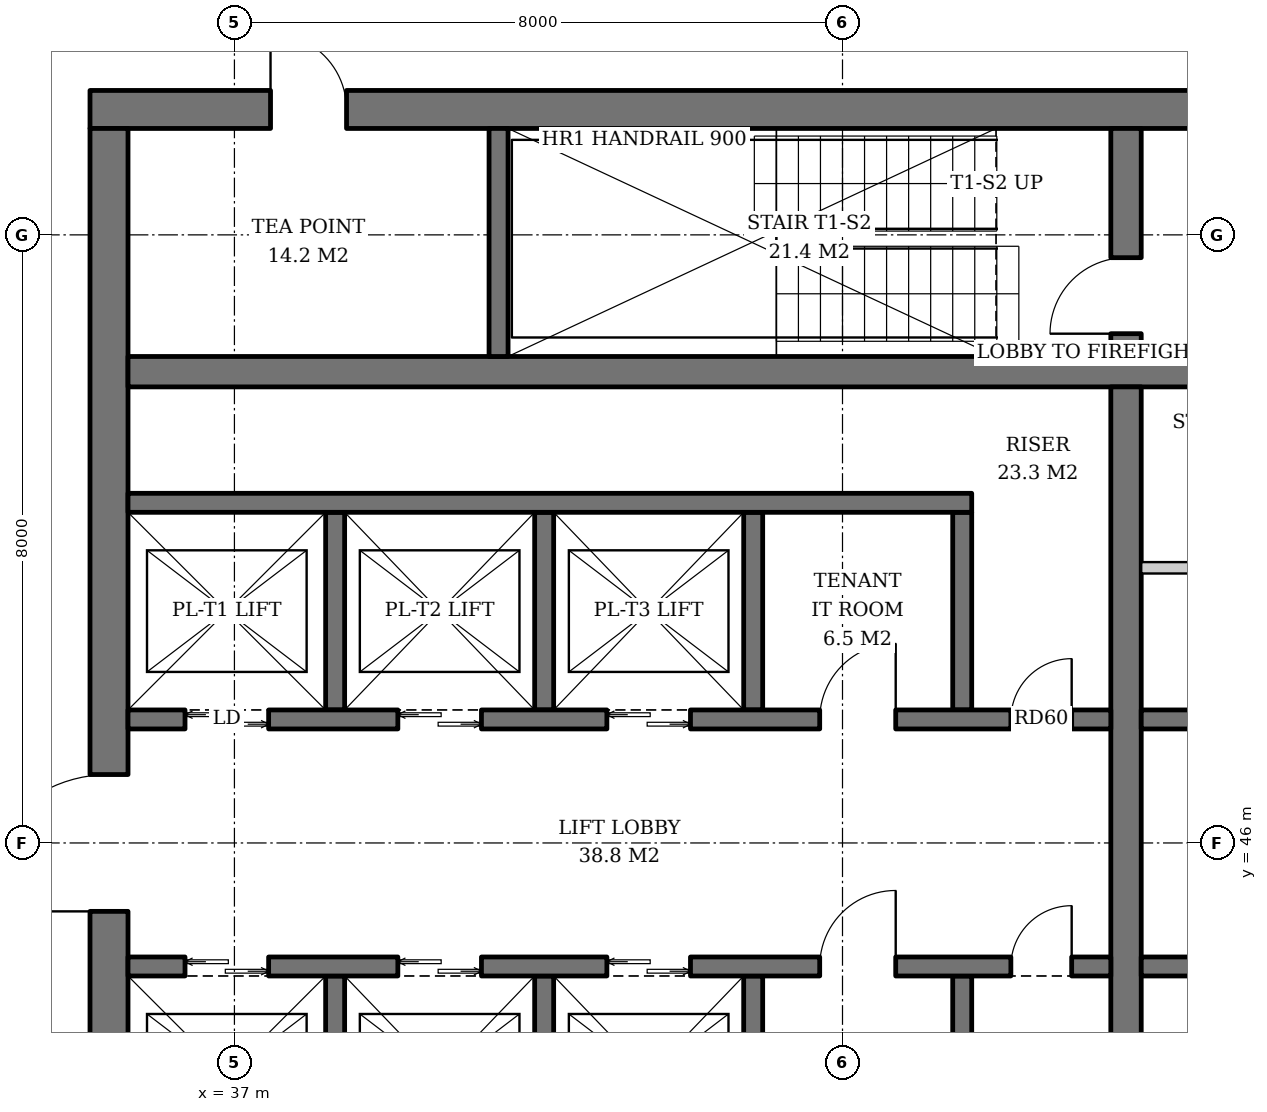
"""IFC4 building model, lengths in metres.
Left out: names, types, materials, properties, quantities, classifications, styles, units other than length and angle.
Written with IfcOpenShell. Run it as: python <this file> out.ifc"""

import sys

from ifc_helpers import new_model, si_unit, direction, frame, frame_2d, origin, place, context, subcontext, project, spatial, rectangle, extrude, element, fill, save


model = new_model("IFC4")
c1 = context("Model", 3, precision=1e-05, world=origin(), true_north=direction((0.0, 1.0)))
c2 = subcontext(c1, "Body", "Model", "MODEL_VIEW")
j1 = project(units=[si_unit("LENGTHUNIT", "METRE"), si_unit("PLANEANGLEUNIT", "RADIAN")], contexts=[c1])
p1 = place(None, origin())
s1 = spatial("IfcSite", under=j1, at=p1, CompositionType="ELEMENT")
p2 = place(p1, origin())
s2 = spatial("IfcBuilding", under=s1, at=p2, CompositionType="ELEMENT")
p3 = place(p2, frame((0.0, 0.0, 271.8)))
s3 = spatial("IfcBuildingStorey", under=s2, at=p3, CompositionType="ELEMENT", Elevation=271.8)
p4 = place(p3, frame((35.1, 55.65, 0.0), z_axis=(0.0, 0.0, 1.0), x_axis=(1.0, 0.0, 0.0)))
e1 = element("IfcWall", 1, at=p4, inside=s3, PredefinedType="SHEAR", context=c2, shape_type="SweptSolid", body=[
    extrude(rectangle(XDim=19.8, YDim=0.5, at=frame_2d((9.9, 0.0))), origin(), (0.0, 0.0, 1.0), 3.8),
])
p5 = place(p4, frame((14.54, 0.0, 0.0)))
e2 = element("IfcOpeningElement", 2, at=p5, cuts=e1, PredefinedType="OPENING", context=c2, shape_type="SweptSolid", body=[
    extrude(rectangle(XDim=1.0, YDim=2.1, at=frame_2d((0.5, 1.05))), frame((0.0, 0.26, 0.0), z_axis=(0.0, -1.0, 0.0), x_axis=(1.0, 0.0, 0.0)), (0.0, 0.0, 1.0), 0.52),
])
p6 = place(p4, frame((2.375, 0.0, 0.0)))
e3 = element("IfcOpeningElement", 3, at=p6, cuts=e1, PredefinedType="OPENING", context=c2, shape_type="SweptSolid", body=[
    extrude(rectangle(XDim=1.0, YDim=2.1, at=frame_2d((0.5, 1.05))), frame((0.0, 0.26, 0.0), z_axis=(0.0, -1.0, 0.0), x_axis=(1.0, 0.0, 0.0)), (0.0, 0.0, 1.0), 0.52),
])
p7 = place(p3, frame((35.35, 36.6, 0.0), z_axis=(0.0, 0.0, 1.0), x_axis=(0.0, 1.0, 0.0)))
e4 = element("IfcWall", 4, at=p7, inside=s3, PredefinedType="SHEAR", context=c2, shape_type="SweptSolid", body=[
    extrude(rectangle(XDim=18.8, YDim=0.5, at=frame_2d((9.4, 0.0))), origin(), (0.0, 0.0, 1.0), 3.8),
])
p8 = place(p7, frame((8.5, 0.0, 0.0)))
e5 = element("IfcOpeningElement", 5, at=p8, cuts=e4, PredefinedType="OPENING", context=c2, shape_type="SweptSolid", body=[
    extrude(rectangle(XDim=1.8, YDim=2.4, at=frame_2d((0.9, 1.2))), frame((0.0, 0.26, 0.0), z_axis=(0.0, -1.0, 0.0), x_axis=(1.0, 0.0, 0.0)), (0.0, 0.0, 1.0), 0.52),
])
p9 = place(p3, frame((35.6, 52.2, 0.0), z_axis=(0.0, 0.0, 1.0), x_axis=(1.0, 0.0, 0.0)))
e6 = element("IfcWall", 6, at=p9, inside=s3, PredefinedType="SHEAR", context=c2, shape_type="SweptSolid", body=[
    extrude(rectangle(XDim=18.8, YDim=0.4, at=frame_2d((9.4, 0.0))), origin(), (0.0, 0.0, 1.0), 3.8),
])
p10 = place(p3, frame((48.73, 40.0, 0.0), z_axis=(0.0, 0.0, 1.0), x_axis=(0.0, 1.0, 0.0)))
e7 = element("IfcWall", 7, at=p10, inside=s3, PredefinedType="SHEAR", context=c2, shape_type="SweptSolid", body=[
    extrude(rectangle(XDim=12.0, YDim=0.4, at=frame_2d((6.0, 0.0))), origin(), (0.0, 0.0, 1.0), 3.8),
])
p11 = place(p3, frame((48.73, 52.4, 0.0), z_axis=(0.0, 0.0, 1.0), x_axis=(0.0, 1.0, 0.0)))
e8 = element("IfcWall", 8, at=p11, inside=s3, PredefinedType="SHEAR", context=c2, shape_type="SweptSolid", body=[
    extrude(rectangle(XDim=3.0, YDim=0.4, at=frame_2d((1.5, 0.0))), origin(), (0.0, 0.0, 1.0), 3.8),
])
p12 = place(p11, frame((0.3, 0.0, 0.0)))
e9 = element("IfcOpeningElement", 9, at=p12, cuts=e8, PredefinedType="OPENING", context=c2, shape_type="SweptSolid", body=[
    extrude(rectangle(XDim=1.0, YDim=2.1, at=frame_2d((0.5, 1.05))), frame((0.0, 0.21, 0.0), z_axis=(0.0, -1.0, 0.0), x_axis=(1.0, 0.0, 0.0)), (0.0, 0.0, 1.0), 0.42),
])
p13 = place(p3, frame((40.475, 52.4, 0.0), z_axis=(0.0, 0.0, 1.0), x_axis=(0.0, 1.0, 0.0)))
e10 = element("IfcWall", 10, at=p13, inside=s3, PredefinedType="SHEAR", context=c2, shape_type="SweptSolid", body=[
    extrude(rectangle(XDim=3.0, YDim=0.25, at=frame_2d((1.5, 0.0))), origin(), (0.0, 0.0, 1.0), 3.8),
])
for number, where, z_axis, x_axis in (
    (11, (38.325, 47.75, 0.0), (0.0, 0.0, 1.0), (0.0, 1.0, 0.0)),
    (12, (41.075, 47.75, 0.0), (0.0, 0.0, 1.0), (0.0, 1.0, 0.0)),
    (13, (43.825, 47.75, 0.0), (0.0, 0.0, 1.0), (0.0, 1.0, 0.0)),
    (14, (46.575, 47.75, 0.0), (0.0, 0.0, 1.0), (0.0, 1.0, 0.0)),
):
    element("IfcWall", number, at=place(p3, frame(where, z_axis=z_axis, x_axis=x_axis)), inside=s3, PredefinedType="SHEAR", context=c2, shape_type="SweptSolid", body=[
        extrude(rectangle(XDim=2.6, YDim=0.25, at=frame_2d((1.3, 0.0))), origin(), (0.0, 0.0, 1.0), 3.8),
    ])
p14 = place(p3, frame((35.6, 50.475, 0.0), z_axis=(0.0, 0.0, 1.0), x_axis=(1.0, 0.0, 0.0)))
e15 = element("IfcWall", 15, at=p14, inside=s3, PredefinedType="SHEAR", context=c2, shape_type="SweptSolid", body=[
    extrude(rectangle(XDim=11.1, YDim=0.25, at=frame_2d((5.55, 0.0))), origin(), (0.0, 0.0, 1.0), 3.8),
])
p15 = place(p3, frame((35.6, 47.625, 0.0), z_axis=(0.0, 0.0, 1.0), x_axis=(1.0, 0.0, 0.0)))
e16 = element("IfcWall", 16, at=p15, inside=s3, PredefinedType="SHEAR", context=c2, shape_type="SweptSolid", body=[
    extrude(rectangle(XDim=12.93, YDim=0.25, at=frame_2d((6.465, 0.0))), origin(), (0.0, 0.0, 1.0), 3.8),
])
p16 = place(p15, frame((0.75, 0.0, 0.0)))
e17 = element("IfcOpeningElement", 17, at=p16, cuts=e16, PredefinedType="OPENING", context=c2, shape_type="SweptSolid", body=[
    extrude(rectangle(XDim=1.1, YDim=2.2, at=frame_2d((0.55, 1.1))), frame((0.0, 0.135, 0.0), z_axis=(0.0, -1.0, 0.0), x_axis=(1.0, 0.0, 0.0)), (0.0, 0.0, 1.0), 0.27),
])
p17 = place(p15, frame((3.55, 0.0, 0.0)))
e18 = element("IfcOpeningElement", 18, at=p17, cuts=e16, PredefinedType="OPENING", context=c2, shape_type="SweptSolid", body=[
    extrude(rectangle(XDim=1.1, YDim=2.2, at=frame_2d((0.55, 1.1))), frame((0.0, 0.135, 0.0), z_axis=(0.0, -1.0, 0.0), x_axis=(1.0, 0.0, 0.0)), (0.0, 0.0, 1.0), 0.27),
])
p18 = place(p15, frame((6.3, 0.0, 0.0)))
e19 = element("IfcOpeningElement", 19, at=p18, cuts=e16, PredefinedType="OPENING", context=c2, shape_type="SweptSolid", body=[
    extrude(rectangle(XDim=1.1, YDim=2.2, at=frame_2d((0.55, 1.1))), frame((0.0, 0.135, 0.0), z_axis=(0.0, -1.0, 0.0), x_axis=(1.0, 0.0, 0.0)), (0.0, 0.0, 1.0), 0.27),
])
p19 = place(p15, frame((9.1, 0.0, 0.0)))
e20 = element("IfcOpeningElement", 20, at=p19, cuts=e16, PredefinedType="OPENING", context=c2, shape_type="SweptSolid", body=[
    extrude(rectangle(XDim=1.0, YDim=2.1, at=frame_2d((0.5, 1.05))), frame((0.0, 0.135, 0.0), z_axis=(0.0, -1.0, 0.0), x_axis=(1.0, 0.0, 0.0)), (0.0, 0.0, 1.0), 0.27),
])
p20 = place(p15, frame((11.615, 0.0, 0.0)))
e21 = element("IfcOpeningElement", 21, at=p20, cuts=e16, PredefinedType="OPENING", context=c2, shape_type="SweptSolid", body=[
    extrude(rectangle(XDim=0.8, YDim=2.0, at=frame_2d((0.4, 1.0))), frame((0.0, 0.135, 0.0), z_axis=(0.0, -1.0, 0.0), x_axis=(1.0, 0.0, 0.0)), (0.0, 0.0, 1.0), 0.27),
])
for number, where, z_axis, x_axis in (
    (22, (38.325, 44.25, 0.0), (0.0, 0.0, 1.0), (0.0, -1.0, 0.0)),
    (23, (41.075, 44.25, 0.0), (0.0, 0.0, 1.0), (0.0, -1.0, 0.0)),
    (24, (43.825, 44.25, 0.0), (0.0, 0.0, 1.0), (0.0, -1.0, 0.0)),
    (25, (46.575, 44.25, 0.0), (0.0, 0.0, 1.0), (0.0, -1.0, 0.0)),
):
    element("IfcWall", number, at=place(p3, frame(where, z_axis=z_axis, x_axis=x_axis)), inside=s3, PredefinedType="SHEAR", context=c2, shape_type="SweptSolid", body=[
        extrude(rectangle(XDim=2.6, YDim=0.25, at=frame_2d((1.3, 0.0))), origin(), (0.0, 0.0, 1.0), 3.8),
    ])
p21 = place(p3, frame((35.6, 44.375, 0.0), z_axis=(0.0, 0.0, 1.0), x_axis=(1.0, 0.0, 0.0)))
e26 = element("IfcWall", 26, at=p21, inside=s3, PredefinedType="SHEAR", context=c2, shape_type="SweptSolid", body=[
    extrude(rectangle(XDim=12.93, YDim=0.25, at=frame_2d((6.465, 0.0))), origin(), (0.0, 0.0, 1.0), 3.8),
])
p22 = place(p21, frame((0.75, 0.0, 0.0)))
e27 = element("IfcOpeningElement", 27, at=p22, cuts=e26, PredefinedType="OPENING", context=c2, shape_type="SweptSolid", body=[
    extrude(rectangle(XDim=1.1, YDim=2.2, at=frame_2d((0.55, 1.1))), frame((0.0, 0.135, 0.0), z_axis=(0.0, -1.0, 0.0), x_axis=(1.0, 0.0, 0.0)), (0.0, 0.0, 1.0), 0.27),
])
p23 = place(p21, frame((3.55, 0.0, 0.0)))
e28 = element("IfcOpeningElement", 28, at=p23, cuts=e26, PredefinedType="OPENING", context=c2, shape_type="SweptSolid", body=[
    extrude(rectangle(XDim=1.1, YDim=2.2, at=frame_2d((0.55, 1.1))), frame((0.0, 0.135, 0.0), z_axis=(0.0, -1.0, 0.0), x_axis=(1.0, 0.0, 0.0)), (0.0, 0.0, 1.0), 0.27),
])
p24 = place(p21, frame((6.3, 0.0, 0.0)))
e29 = element("IfcOpeningElement", 29, at=p24, cuts=e26, PredefinedType="OPENING", context=c2, shape_type="SweptSolid", body=[
    extrude(rectangle(XDim=1.1, YDim=2.2, at=frame_2d((0.55, 1.1))), frame((0.0, 0.135, 0.0), z_axis=(0.0, -1.0, 0.0), x_axis=(1.0, 0.0, 0.0)), (0.0, 0.0, 1.0), 0.27),
])
p25 = place(p21, frame((9.1, 0.0, 0.0)))
e30 = element("IfcOpeningElement", 30, at=p25, cuts=e26, PredefinedType="OPENING", context=c2, shape_type="SweptSolid", body=[
    extrude(rectangle(XDim=1.0, YDim=2.1, at=frame_2d((0.5, 1.05))), frame((0.0, 0.135, 0.0), z_axis=(0.0, -1.0, 0.0), x_axis=(1.0, 0.0, 0.0)), (0.0, 0.0, 1.0), 0.27),
])
p26 = place(p21, frame((11.615, 0.0, 0.0)))
e31 = element("IfcOpeningElement", 31, at=p26, cuts=e26, PredefinedType="OPENING", context=c2, shape_type="SweptSolid", body=[
    extrude(rectangle(XDim=0.8, YDim=2.0, at=frame_2d((0.4, 1.0))), frame((0.0, 0.135, 0.0), z_axis=(0.0, -1.0, 0.0), x_axis=(1.0, 0.0, 0.0)), (0.0, 0.0, 1.0), 0.27),
])
p27 = place(p3, frame((48.93, 47.625, 0.0), z_axis=(0.0, 0.0, 1.0), x_axis=(1.0, 0.0, 0.0)))
e32 = element("IfcWall", 32, at=p27, inside=s3, PredefinedType="SHEAR", context=c2, shape_type="SweptSolid", body=[
    extrude(rectangle(XDim=5.47, YDim=0.25, at=frame_2d((2.735, 0.0))), origin(), (0.0, 0.0, 1.0), 3.8),
])
p28 = place(p27, frame((0.78, 0.0, 0.0)))
e33 = element("IfcOpeningElement", 33, at=p28, cuts=e32, PredefinedType="OPENING", context=c2, shape_type="SweptSolid", body=[
    extrude(rectangle(XDim=1.0, YDim=2.1, at=frame_2d((0.5, 1.05))), frame((0.0, 0.135, 0.0), z_axis=(0.0, -1.0, 0.0), x_axis=(1.0, 0.0, 0.0)), (0.0, 0.0, 1.0), 0.27),
])
p29 = place(p27, frame((3.64, 0.0, 0.0)))
e34 = element("IfcOpeningElement", 34, at=p29, cuts=e32, PredefinedType="OPENING", context=c2, shape_type="SweptSolid", body=[
    extrude(rectangle(XDim=1.0, YDim=2.1, at=frame_2d((0.5, 1.05))), frame((0.0, 0.135, 0.0), z_axis=(0.0, -1.0, 0.0), x_axis=(1.0, 0.0, 0.0)), (0.0, 0.0, 1.0), 0.27),
])
p30 = place(p3, frame((48.93, 44.375, 0.0), z_axis=(0.0, 0.0, 1.0), x_axis=(1.0, 0.0, 0.0)))
e35 = element("IfcWall", 35, at=p30, inside=s3, PredefinedType="SHEAR", context=c2, shape_type="SweptSolid", body=[
    extrude(rectangle(XDim=5.47, YDim=0.25, at=frame_2d((2.735, 0.0))), origin(), (0.0, 0.0, 1.0), 3.8),
])
p31 = place(p30, frame((0.78, 0.0, 0.0)))
e36 = element("IfcOpeningElement", 36, at=p31, cuts=e35, PredefinedType="OPENING", context=c2, shape_type="SweptSolid", body=[
    extrude(rectangle(XDim=1.0, YDim=2.1, at=frame_2d((0.5, 1.05))), frame((0.0, 0.135, 0.0), z_axis=(0.0, -1.0, 0.0), x_axis=(1.0, 0.0, 0.0)), (0.0, 0.0, 1.0), 0.27),
])
p32 = place(p30, frame((3.64, 0.0, 0.0)))
e37 = element("IfcOpeningElement", 37, at=p32, cuts=e35, PredefinedType="OPENING", context=c2, shape_type="SweptSolid", body=[
    extrude(rectangle(XDim=1.0, YDim=2.1, at=frame_2d((0.5, 1.05))), frame((0.0, 0.135, 0.0), z_axis=(0.0, -1.0, 0.0), x_axis=(1.0, 0.0, 0.0)), (0.0, 0.0, 1.0), 0.27),
])
p33 = place(p3, frame((48.93, 49.62, 0.0), z_axis=(0.0, 0.0, 1.0), x_axis=(1.0, 0.0, 0.0)))
e38 = element("IfcWall", 38, at=p33, inside=s3, PredefinedType="SOLIDWALL", context=c2, shape_type="SweptSolid", body=[
    extrude(rectangle(XDim=2.56, YDim=0.15, at=frame_2d((1.28, 0.0))), origin(), (0.0, 0.0, 1.0), 3.62),
])
p34 = place(p33, frame((0.78, 0.0, 0.0)))
e39 = element("IfcOpeningElement", 39, at=p34, cuts=e38, PredefinedType="OPENING", context=c2, shape_type="SweptSolid", body=[
    extrude(rectangle(XDim=1.0, YDim=2.1, at=frame_2d((0.5, 1.05))), frame((0.0, 0.085, 0.0), z_axis=(0.0, -1.0, 0.0), x_axis=(1.0, 0.0, 0.0)), (0.0, 0.0, 1.0), 0.17),
])
p35 = place(p16, origin())
e40 = element("IfcDoor", 40, at=p35, inside=s3, OperationType="DOUBLE_DOOR_SLIDING", PredefinedType="DOOR", context=c2, shape_type="SweptSolid", body=[
    extrude(rectangle(XDim=1.1, YDim=2.2, at=frame_2d((0.55, 1.1))), frame((0.0, 0.025, 0.0), z_axis=(0.0, -1.0, 0.0), x_axis=(1.0, 0.0, 0.0)), (0.0, 0.0, 1.0), 0.05),
])
fill(e17, e40)
p36 = place(p17, origin())
e41 = element("IfcDoor", 41, at=p36, inside=s3, OperationType="DOUBLE_DOOR_SLIDING", PredefinedType="DOOR", context=c2, shape_type="SweptSolid", body=[
    extrude(rectangle(XDim=1.1, YDim=2.2, at=frame_2d((0.55, 1.1))), frame((0.0, 0.025, 0.0), z_axis=(0.0, -1.0, 0.0), x_axis=(1.0, 0.0, 0.0)), (0.0, 0.0, 1.0), 0.05),
])
fill(e18, e41)
p37 = place(p18, origin())
e42 = element("IfcDoor", 42, at=p37, inside=s3, OperationType="DOUBLE_DOOR_SLIDING", PredefinedType="DOOR", context=c2, shape_type="SweptSolid", body=[
    extrude(rectangle(XDim=1.1, YDim=2.2, at=frame_2d((0.55, 1.1))), frame((0.0, 0.025, 0.0), z_axis=(0.0, -1.0, 0.0), x_axis=(1.0, 0.0, 0.0)), (0.0, 0.0, 1.0), 0.05),
])
fill(e19, e42)
p38 = place(p19, origin())
e43 = element("IfcDoor", 43, at=p38, inside=s3, OperationType="SINGLE_SWING_RIGHT", PredefinedType="DOOR", context=c2, shape_type="SweptSolid", body=[
    extrude(rectangle(XDim=1.0, YDim=2.1, at=frame_2d((0.5, 1.05))), frame((0.0, 0.025, 0.0), z_axis=(0.0, -1.0, 0.0), x_axis=(1.0, 0.0, 0.0)), (0.0, 0.0, 1.0), 0.05),
])
fill(e20, e43)
p39 = place(p20, origin())
e44 = element("IfcDoor", 44, at=p39, inside=s3, OperationType="SINGLE_SWING_RIGHT", PredefinedType="DOOR", context=c2, shape_type="SweptSolid", body=[
    extrude(rectangle(XDim=0.8, YDim=2.0, at=frame_2d((0.4, 1.0))), frame((0.0, 0.025, 0.0), z_axis=(0.0, -1.0, 0.0), x_axis=(1.0, 0.0, 0.0)), (0.0, 0.0, 1.0), 0.05),
])
fill(e21, e44)
p40 = place(p22, origin())
e45 = element("IfcDoor", 45, at=p40, inside=s3, OperationType="DOUBLE_DOOR_SLIDING", PredefinedType="DOOR", context=c2, shape_type="SweptSolid", body=[
    extrude(rectangle(XDim=1.1, YDim=2.2, at=frame_2d((0.55, 1.1))), frame((0.0, 0.025, 0.0), z_axis=(0.0, -1.0, 0.0), x_axis=(1.0, 0.0, 0.0)), (0.0, 0.0, 1.0), 0.05),
])
fill(e27, e45)
p41 = place(p23, origin())
e46 = element("IfcDoor", 46, at=p41, inside=s3, OperationType="DOUBLE_DOOR_SLIDING", PredefinedType="DOOR", context=c2, shape_type="SweptSolid", body=[
    extrude(rectangle(XDim=1.1, YDim=2.2, at=frame_2d((0.55, 1.1))), frame((0.0, 0.025, 0.0), z_axis=(0.0, -1.0, 0.0), x_axis=(1.0, 0.0, 0.0)), (0.0, 0.0, 1.0), 0.05),
])
fill(e28, e46)
p42 = place(p24, origin())
e47 = element("IfcDoor", 47, at=p42, inside=s3, OperationType="DOUBLE_DOOR_SLIDING", PredefinedType="DOOR", context=c2, shape_type="SweptSolid", body=[
    extrude(rectangle(XDim=1.1, YDim=2.2, at=frame_2d((0.55, 1.1))), frame((0.0, 0.025, 0.0), z_axis=(0.0, -1.0, 0.0), x_axis=(1.0, 0.0, 0.0)), (0.0, 0.0, 1.0), 0.05),
])
fill(e29, e47)
p43 = place(p25, origin())
e48 = element("IfcDoor", 48, at=p43, inside=s3, OperationType="SINGLE_SWING_RIGHT", PredefinedType="DOOR", context=c2, shape_type="SweptSolid", body=[
    extrude(rectangle(XDim=1.0, YDim=2.1, at=frame_2d((0.5, 1.05))), frame((0.0, 0.025, 0.0), z_axis=(0.0, -1.0, 0.0), x_axis=(1.0, 0.0, 0.0)), (0.0, 0.0, 1.0), 0.05),
])
fill(e30, e48)
p44 = place(p26, origin())
e49 = element("IfcDoor", 49, at=p44, inside=s3, OperationType="SINGLE_SWING_RIGHT", PredefinedType="DOOR", context=c2, shape_type="SweptSolid", body=[
    extrude(rectangle(XDim=0.8, YDim=2.0, at=frame_2d((0.4, 1.0))), frame((0.0, 0.025, 0.0), z_axis=(0.0, -1.0, 0.0), x_axis=(1.0, 0.0, 0.0)), (0.0, 0.0, 1.0), 0.05),
])
fill(e31, e49)
p45 = place(p12, origin())
e50 = element("IfcDoor", 50, at=p45, inside=s3, OperationType="SINGLE_SWING_LEFT", PredefinedType="DOOR", context=c2, shape_type="SweptSolid", body=[
    extrude(rectangle(XDim=1.0, YDim=2.1, at=frame_2d((0.5, 1.05))), frame((0.0, 0.025, 0.0), z_axis=(0.0, -1.0, 0.0), x_axis=(1.0, 0.0, 0.0)), (0.0, 0.0, 1.0), 0.05),
])
fill(e9, e50)
p46 = place(p8, origin())
e51 = element("IfcDoor", 51, at=p46, inside=s3, OperationType="DOUBLE_DOOR_SINGLE_SWING", PredefinedType="DOOR", context=c2, shape_type="SweptSolid", body=[
    extrude(rectangle(XDim=1.8, YDim=2.4, at=frame_2d((0.9, 1.2))), frame((0.0, 0.025, 0.0), z_axis=(0.0, -1.0, 0.0), x_axis=(1.0, 0.0, 0.0)), (0.0, 0.0, 1.0), 0.05),
])
fill(e5, e51)
p47 = place(p6, origin())
e52 = element("IfcDoor", 52, at=p47, inside=s3, OperationType="SINGLE_SWING_LEFT", PredefinedType="DOOR", context=c2, shape_type="SweptSolid", body=[
    extrude(rectangle(XDim=1.0, YDim=2.1, at=frame_2d((0.5, 1.05))), frame((0.0, -0.19, 0.0), z_axis=(0.0, -1.0, 0.0), x_axis=(1.0, 0.0, 0.0)), (0.0, 0.0, 1.0), 0.05),
])
fill(e3, e52)
save(model, sys.argv[1])
